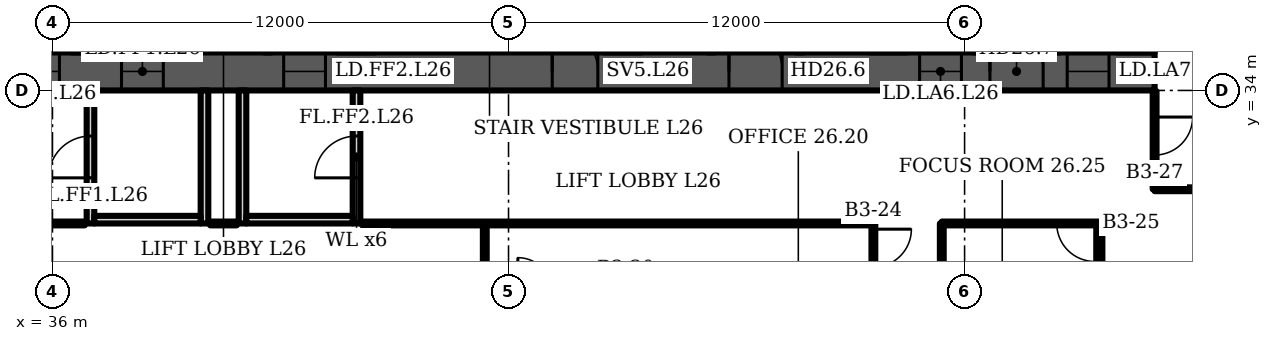
"""IFC4 building model, lengths in metres.
Left out: names, types, materials, properties, quantities, classifications, styles, units other than length and angle.
Written with IfcOpenShell. Run it as: python <this file> out.ifc"""

import sys

from ifc_helpers import new_model, si_unit, direction, frame, frame_2d, origin, place, context, subcontext, project, spatial, rectangle, extrude, element, fill, save


model = new_model("IFC4")
c1 = context("Model", 3, precision=1e-05, world=origin(), true_north=direction((0.0, 1.0)))
c2 = subcontext(c1, "Body", "Model", "MODEL_VIEW")
j1 = project(units=[si_unit("LENGTHUNIT", "METRE"), si_unit("PLANEANGLEUNIT", "RADIAN")], contexts=[c1])
p1 = place(None, origin())
s1 = spatial("IfcSite", under=j1, at=p1, CompositionType="ELEMENT")
p2 = place(p1, origin())
s2 = spatial("IfcBuilding", under=s1, at=p2, CompositionType="ELEMENT")
p3 = place(p2, frame((0.0, 0.0, 114.7)))
s3 = spatial("IfcBuildingStorey", under=s2, at=p3, CompositionType="ELEMENT", Elevation=114.7)
p4 = place(p3, frame((16.0, 34.5, 0.0), z_axis=(0.0, 0.0, 1.0), x_axis=(1.0, 0.0, 0.0)))
e1 = element("IfcWall", 1, at=p4, inside=s3, PredefinedType="SHEAR", context=c2, shape_type="SweptSolid", body=[
    extrude(rectangle(XDim=49.0, YDim=1.0, at=frame_2d((24.5, 0.0))), origin(), (0.0, 0.0, 1.0), 3.6),
])
p5 = place(p4, frame((1.2, 0.0, 0.0)))
e2 = element("IfcOpeningElement", 2, at=p5, cuts=e1, PredefinedType="OPENING", context=c2, shape_type="SweptSolid", body=[
    extrude(rectangle(XDim=1.1, YDim=2.1, at=frame_2d((0.55, 1.05))), frame((0.0, 0.51, 0.0), z_axis=(0.0, -1.0, 0.0), x_axis=(1.0, 0.0, 0.0)), (0.0, 0.0, 1.0), 1.02),
])
p6 = place(p4, frame((5.083, 0.0, 0.0)))
e3 = element("IfcOpeningElement", 3, at=p6, cuts=e1, PredefinedType="OPENING", context=c2, shape_type="SweptSolid", body=[
    extrude(rectangle(XDim=1.1, YDim=2.1, at=frame_2d((0.55, 1.05))), frame((0.0, 0.51, 0.0), z_axis=(0.0, -1.0, 0.0), x_axis=(1.0, 0.0, 0.0)), (0.0, 0.0, 1.0), 1.02),
])
p7 = place(p4, frame((2.933, 0.0, 0.0)))
e4 = element("IfcOpeningElement", 4, at=p7, cuts=e1, PredefinedType="OPENING", context=c2, shape_type="SweptSolid", body=[
    extrude(rectangle(XDim=1.4, YDim=2.1, at=frame_2d((0.7, 1.05))), frame((0.0, 0.51, 0.0), z_axis=(0.0, -1.0, 0.0), x_axis=(1.0, 0.0, 0.0)), (0.0, 0.0, 1.0), 1.02),
])
p8 = place(p4, frame((7.65, 0.0, 0.0)))
e5 = element("IfcOpeningElement", 5, at=p8, cuts=e1, PredefinedType="OPENING", context=c2, shape_type="SweptSolid", body=[
    extrude(rectangle(XDim=1.2, YDim=2.1, at=frame_2d((0.6, 1.05))), frame((0.0, 0.51, 0.0), z_axis=(0.0, -1.0, 0.0), x_axis=(1.0, 0.0, 0.0)), (0.0, 0.0, 1.0), 1.02),
])
p9 = place(p4, frame((14.817, 0.0, 0.0)))
e6 = element("IfcOpeningElement", 6, at=p9, cuts=e1, PredefinedType="OPENING", context=c2, shape_type="SweptSolid", body=[
    extrude(rectangle(XDim=1.1, YDim=2.1, at=frame_2d((0.55, 1.05))), frame((0.0, 0.51, 0.0), z_axis=(0.0, -1.0, 0.0), x_axis=(1.0, 0.0, 0.0)), (0.0, 0.0, 1.0), 1.02),
])
p10 = place(p4, frame((19.083, 0.0, 0.0)))
e7 = element("IfcOpeningElement", 7, at=p10, cuts=e1, PredefinedType="OPENING", context=c2, shape_type="SweptSolid", body=[
    extrude(rectangle(XDim=1.1, YDim=2.1, at=frame_2d((0.55, 1.05))), frame((0.0, 0.51, 0.0), z_axis=(0.0, -1.0, 0.0), x_axis=(1.0, 0.0, 0.0)), (0.0, 0.0, 1.0), 1.02),
])
p11 = place(p4, frame((16.8, 0.0, 0.0)))
e8 = element("IfcOpeningElement", 8, at=p11, cuts=e1, PredefinedType="OPENING", context=c2, shape_type="SweptSolid", body=[
    extrude(rectangle(XDim=1.4, YDim=2.1, at=frame_2d((0.7, 1.05))), frame((0.0, 0.51, 0.0), z_axis=(0.0, -1.0, 0.0), x_axis=(1.0, 0.0, 0.0)), (0.0, 0.0, 1.0), 1.02),
])
p12 = place(p4, frame((21.817, 0.0, 0.0)))
e9 = element("IfcOpeningElement", 9, at=p12, cuts=e1, PredefinedType="OPENING", context=c2, shape_type="SweptSolid", body=[
    extrude(rectangle(XDim=1.1, YDim=2.1, at=frame_2d((0.55, 1.05))), frame((0.0, 0.51, 0.0), z_axis=(0.0, -1.0, 0.0), x_axis=(1.0, 0.0, 0.0)), (0.0, 0.0, 1.0), 1.02),
])
p13 = place(p4, frame((26.083, 0.0, 0.0)))
e10 = element("IfcOpeningElement", 10, at=p13, cuts=e1, PredefinedType="OPENING", context=c2, shape_type="SweptSolid", body=[
    extrude(rectangle(XDim=1.1, YDim=2.1, at=frame_2d((0.55, 1.05))), frame((0.0, 0.51, 0.0), z_axis=(0.0, -1.0, 0.0), x_axis=(1.0, 0.0, 0.0)), (0.0, 0.0, 1.0), 1.02),
])
p14 = place(p4, frame((33.15, 0.0, 0.0)))
e11 = element("IfcOpeningElement", 11, at=p14, cuts=e1, PredefinedType="OPENING", context=c2, shape_type="SweptSolid", body=[
    extrude(rectangle(XDim=1.2, YDim=2.1, at=frame_2d((0.6, 1.05))), frame((0.0, 0.51, 0.0), z_axis=(0.0, -1.0, 0.0), x_axis=(1.0, 0.0, 0.0)), (0.0, 0.0, 1.0), 1.02),
])
p15 = place(p4, frame((37.8, 0.0, 0.0)))
e12 = element("IfcOpeningElement", 12, at=p15, cuts=e1, PredefinedType="OPENING", context=c2, shape_type="SweptSolid", body=[
    extrude(rectangle(XDim=1.4, YDim=2.1, at=frame_2d((0.7, 1.05))), frame((0.0, 0.51, 0.0), z_axis=(0.0, -1.0, 0.0), x_axis=(1.0, 0.0, 0.0)), (0.0, 0.0, 1.0), 1.02),
])
p16 = place(p4, frame((42.817, 0.0, 0.0)))
e13 = element("IfcOpeningElement", 13, at=p16, cuts=e1, PredefinedType="OPENING", context=c2, shape_type="SweptSolid", body=[
    extrude(rectangle(XDim=1.1, YDim=2.1, at=frame_2d((0.55, 1.05))), frame((0.0, 0.51, 0.0), z_axis=(0.0, -1.0, 0.0), x_axis=(1.0, 0.0, 0.0)), (0.0, 0.0, 1.0), 1.02),
])
p17 = place(p4, frame((46.7, 0.0, 0.0)))
e14 = element("IfcOpeningElement", 14, at=p17, cuts=e1, PredefinedType="OPENING", context=c2, shape_type="SweptSolid", body=[
    extrude(rectangle(XDim=1.1, YDim=2.1, at=frame_2d((0.55, 1.05))), frame((0.0, 0.51, 0.0), z_axis=(0.0, -1.0, 0.0), x_axis=(1.0, 0.0, 0.0)), (0.0, 0.0, 1.0), 1.02),
])
p18 = place(p4, frame((44.667, 0.0, 0.0)))
e15 = element("IfcOpeningElement", 15, at=p18, cuts=e1, PredefinedType="OPENING", context=c2, shape_type="SweptSolid", body=[
    extrude(rectangle(XDim=1.4, YDim=2.1, at=frame_2d((0.7, 1.05))), frame((0.0, 0.51, 0.0), z_axis=(0.0, -1.0, 0.0), x_axis=(1.0, 0.0, 0.0)), (0.0, 0.0, 1.0), 1.02),
])
p19 = place(p3, frame((37.0, 30.5, 0.0), z_axis=(0.0, 0.0, 1.0), x_axis=(0.0, 1.0, 0.0)))
e16 = element("IfcWall", 16, at=p19, inside=s3, PredefinedType="PARTITIONING", context=c2, shape_type="SweptSolid", body=[
    extrude(rectangle(XDim=3.5, YDim=0.2, at=frame_2d((1.75, 0.0))), origin(), (0.0, 0.0, 1.0), 3.2),
])
p20 = place(p19, frame((1.2, 0.0, 0.0)))
e17 = element("IfcOpeningElement", 17, at=p20, cuts=e16, PredefinedType="OPENING", context=c2, shape_type="SweptSolid", body=[
    extrude(rectangle(XDim=1.1, YDim=2.1, at=frame_2d((0.55, 1.05))), frame((0.0, 0.11, 0.0), z_axis=(0.0, -1.0, 0.0), x_axis=(1.0, 0.0, 0.0)), (0.0, 0.0, 1.0), 0.22),
])
p21 = place(p3, frame((40.0, 30.5, 0.0), z_axis=(0.0, 0.0, 1.0), x_axis=(0.0, 1.0, 0.0)))
e18 = element("IfcWall", 18, at=p21, inside=s3, PredefinedType="PARTITIONING", context=c2, shape_type="SweptSolid", body=[
    extrude(rectangle(XDim=3.5, YDim=0.2, at=frame_2d((1.75, 0.0))), origin(), (0.0, 0.0, 1.0), 3.2),
])
p22 = place(p3, frame((37.1, 30.6, 0.0), z_axis=(0.0, 0.0, 1.0), x_axis=(1.0, 0.0, 0.0)))
e19 = element("IfcWall", 19, at=p22, inside=s3, PredefinedType="PARTITIONING", context=c2, shape_type="SweptSolid", body=[
    extrude(rectangle(XDim=2.8, YDim=0.2, at=frame_2d((1.4, 0.0))), origin(), (0.0, 0.0, 1.0), 3.2),
])
p23 = place(p3, frame((41.0, 30.5, 0.0), z_axis=(0.0, 0.0, 1.0), x_axis=(0.0, 1.0, 0.0)))
e20 = element("IfcWall", 20, at=p23, inside=s3, PredefinedType="PARTITIONING", context=c2, shape_type="SweptSolid", body=[
    extrude(rectangle(XDim=3.5, YDim=0.2, at=frame_2d((1.75, 0.0))), origin(), (0.0, 0.0, 1.0), 3.2),
])
p24 = place(p3, frame((44.0, 30.5, 0.0), z_axis=(0.0, 0.0, 1.0), x_axis=(0.0, 1.0, 0.0)))
e21 = element("IfcWall", 21, at=p24, inside=s3, PredefinedType="PARTITIONING", context=c2, shape_type="SweptSolid", body=[
    extrude(rectangle(XDim=3.5, YDim=0.2, at=frame_2d((1.75, 0.0))), origin(), (0.0, 0.0, 1.0), 3.2),
])
p25 = place(p24, frame((1.2, 0.0, 0.0)))
e22 = element("IfcOpeningElement", 22, at=p25, cuts=e21, PredefinedType="OPENING", context=c2, shape_type="SweptSolid", body=[
    extrude(rectangle(XDim=1.1, YDim=2.1, at=frame_2d((0.55, 1.05))), frame((0.0, 0.11, 0.0), z_axis=(0.0, -1.0, 0.0), x_axis=(1.0, 0.0, 0.0)), (0.0, 0.0, 1.0), 0.22),
])
p26 = place(p3, frame((41.1, 30.6, 0.0), z_axis=(0.0, 0.0, 1.0), x_axis=(1.0, 0.0, 0.0)))
e23 = element("IfcWall", 23, at=p26, inside=s3, PredefinedType="PARTITIONING", context=c2, shape_type="SweptSolid", body=[
    extrude(rectangle(XDim=2.8, YDim=0.2, at=frame_2d((1.4, 0.0))), origin(), (0.0, 0.0, 1.0), 3.2),
])
p27 = place(p3, frame((33.4, 30.5, 0.0), z_axis=(0.0, 0.0, 1.0), x_axis=(1.0, 0.0, 0.0)))
e24 = element("IfcWall", 24, at=p27, inside=s3, PredefinedType="PARTITIONING", context=c2, shape_type="SweptSolid", body=[
    extrude(rectangle(XDim=3.45, YDim=0.1, at=frame_2d((1.725, 0.0))), origin(), (0.0, 0.0, 1.0), 3.2),
])
p28 = place(p3, frame((47.375, 15.13, 0.0), z_axis=(0.0, 0.0, 1.0), x_axis=(0.0, 1.0, 0.0)))
e25 = element("IfcWall", 25, at=p28, inside=s3, PredefinedType="PARTITIONING", context=c2, shape_type="SweptSolid", body=[
    extrude(rectangle(XDim=15.36, YDim=0.1, at=frame_2d((7.68, 0.0))), origin(), (0.0, 0.0, 1.0), 3.2),
])
p29 = place(p3, frame((57.6, -0.79, 0.0), z_axis=(0.0, 0.0, 1.0), x_axis=(0.0, 1.0, 0.0)))
e26 = element("IfcWall", 26, at=p29, inside=s3, PredefinedType="PARTITIONING", context=c2, shape_type="SweptSolid", body=[
    extrude(rectangle(XDim=31.29, YDim=0.1, at=frame_2d((15.645, 0.0))), origin(), (0.0, 0.0, 1.0), 2.58),
])
p30 = place(p29, frame((7.5, 0.0, 0.0)))
e27 = element("IfcOpeningElement", 27, at=p30, cuts=e26, PredefinedType="OPENING", context=c2, shape_type="SweptSolid", body=[
    extrude(rectangle(XDim=1.0, YDim=2.1, at=frame_2d((0.5, 1.05))), frame((0.0, 0.06, 0.0), z_axis=(0.0, -1.0, 0.0), x_axis=(1.0, 0.0, 0.0)), (0.0, 0.0, 1.0), 0.12),
])
p31 = place(p29, frame((17.344, 0.0, 0.0)))
e28 = element("IfcOpeningElement", 28, at=p31, cuts=e26, PredefinedType="OPENING", context=c2, shape_type="SweptSolid", body=[
    extrude(rectangle(XDim=1.0, YDim=2.1, at=frame_2d((0.5, 1.05))), frame((0.0, 0.06, 0.0), z_axis=(0.0, -1.0, 0.0), x_axis=(1.0, 0.0, 0.0)), (0.0, 0.0, 1.0), 0.12),
])
p32 = place(p29, frame((21.185, 0.0, 0.0)))
e29 = element("IfcOpeningElement", 29, at=p32, cuts=e26, PredefinedType="OPENING", context=c2, shape_type="SweptSolid", body=[
    extrude(rectangle(XDim=1.0, YDim=2.1, at=frame_2d((0.5, 1.05))), frame((0.0, 0.06, 0.0), z_axis=(0.0, -1.0, 0.0), x_axis=(1.0, 0.0, 0.0)), (0.0, 0.0, 1.0), 0.12),
])
p33 = place(p29, frame((25.03, 0.0, 0.0)))
e30 = element("IfcOpeningElement", 30, at=p33, cuts=e26, PredefinedType="OPENING", context=c2, shape_type="SweptSolid", body=[
    extrude(rectangle(XDim=1.0, YDim=2.1, at=frame_2d((0.5, 1.05))), frame((0.0, 0.06, 0.0), z_axis=(0.0, -1.0, 0.0), x_axis=(1.0, 0.0, 0.0)), (0.0, 0.0, 1.0), 0.12),
])
p34 = place(p29, frame((30.139, 0.0, 0.0)))
e31 = element("IfcOpeningElement", 31, at=p34, cuts=e26, PredefinedType="OPENING", context=c2, shape_type="SweptSolid", body=[
    extrude(rectangle(XDim=1.0, YDim=2.1, at=frame_2d((0.5, 1.05))), frame((0.0, 0.06, 0.0), z_axis=(0.0, -1.0, 0.0), x_axis=(1.0, 0.0, 0.0)), (0.0, 0.0, 1.0), 0.12),
])
p35 = place(p3, frame((59.4, 13.7, 0.0), z_axis=(0.0, 0.0, 1.0), x_axis=(0.0, 1.0, 0.0)))
e32 = element("IfcWall", 32, at=p35, inside=s3, PredefinedType="PARTITIONING", context=c2, shape_type="SweptSolid", body=[
    extrude(rectangle(XDim=16.8, YDim=0.1, at=frame_2d((8.4, 0.0))), origin(), (0.0, 0.0, 1.0), 3.2),
])
p36 = place(p35, frame((2.45, 0.0, 0.0)))
e33 = element("IfcOpeningElement", 33, at=p36, cuts=e32, PredefinedType="OPENING", context=c2, shape_type="SweptSolid", body=[
    extrude(rectangle(XDim=1.0, YDim=2.1, at=frame_2d((0.5, 1.05))), frame((0.0, 0.06, 0.0), z_axis=(0.0, -1.0, 0.0), x_axis=(1.0, 0.0, 0.0)), (0.0, 0.0, 1.0), 0.12),
])
p37 = place(p35, frame((7.125, 0.0, 0.0)))
e34 = element("IfcOpeningElement", 34, at=p37, cuts=e32, PredefinedType="OPENING", context=c2, shape_type="SweptSolid", body=[
    extrude(rectangle(XDim=1.0, YDim=2.1, at=frame_2d((0.5, 1.05))), frame((0.0, 0.06, 0.0), z_axis=(0.0, -1.0, 0.0), x_axis=(1.0, 0.0, 0.0)), (0.0, 0.0, 1.0), 0.12),
])
p38 = place(p35, frame((11.675, 0.0, 0.0)))
e35 = element("IfcOpeningElement", 35, at=p38, cuts=e32, PredefinedType="OPENING", context=c2, shape_type="SweptSolid", body=[
    extrude(rectangle(XDim=1.0, YDim=2.1, at=frame_2d((0.5, 1.05))), frame((0.0, 0.06, 0.0), z_axis=(0.0, -1.0, 0.0), x_axis=(1.0, 0.0, 0.0)), (0.0, 0.0, 1.0), 0.12),
])
p39 = place(p3, frame((59.4, 30.5, 0.0), z_axis=(0.0, 0.0, 1.0), x_axis=(1.0, 0.0, 0.0)))
e36 = element("IfcWall", 36, at=p39, inside=s3, PredefinedType="PARTITIONING", context=c2, shape_type="SweptSolid", body=[
    extrude(rectangle(XDim=4.175, YDim=0.1, at=frame_2d((2.087, 0.0))), origin(), (0.0, 0.0, 1.0), 3.2),
])
p40 = place(p39, frame((3.025, 0.0, 0.0)))
e37 = element("IfcOpeningElement", 37, at=p40, cuts=e36, PredefinedType="OPENING", context=c2, shape_type="SweptSolid", body=[
    extrude(rectangle(XDim=1.0, YDim=2.1, at=frame_2d((0.5, 1.05))), frame((0.0, 0.06, 0.0), z_axis=(0.0, -1.0, 0.0), x_axis=(1.0, 0.0, 0.0)), (0.0, 0.0, 1.0), 0.12),
])
p41 = place(p3, frame((63.575, 29.075, 0.0), z_axis=(0.0, 0.0, 1.0), x_axis=(0.0, 1.0, 0.0)))
e38 = element("IfcWall", 38, at=p41, inside=s3, PredefinedType="PARTITIONING", context=c2, shape_type="SweptSolid", body=[
    extrude(rectangle(XDim=1.425, YDim=0.1, at=frame_2d((0.712, 0.0))), origin(), (0.0, 0.0, 1.0), 3.2),
])
p42 = place(p3, frame((65.0, 31.4, 0.0), z_axis=(0.0, 0.0, 1.0), x_axis=(0.0, 1.0, 0.0)))
e39 = element("IfcWall", 39, at=p42, inside=s3, PredefinedType="PARTITIONING", context=c2, shape_type="SweptSolid", body=[
    extrude(rectangle(XDim=2.58, YDim=0.1, at=frame_2d((1.29, 0.0))), origin(), (0.0, 0.0, 1.0), 3.2),
])
p43 = place(p42, frame((0.9, 0.0, 0.0)))
e40 = element("IfcOpeningElement", 40, at=p43, cuts=e39, PredefinedType="OPENING", context=c2, shape_type="SweptSolid", body=[
    extrude(rectangle(XDim=1.0, YDim=2.1, at=frame_2d((0.5, 1.05))), frame((0.0, 0.06, 0.0), z_axis=(0.0, -1.0, 0.0), x_axis=(1.0, 0.0, 0.0)), (0.0, 0.0, 1.0), 0.12),
])
p44 = place(p3, frame((65.0, 31.4, 0.0), z_axis=(0.0, 0.0, 1.0), x_axis=(1.0, 0.0, 0.0)))
e41 = element("IfcWall", 41, at=p44, inside=s3, PredefinedType="PARTITIONING", context=c2, shape_type="SweptSolid", body=[
    extrude(rectangle(XDim=4.69, YDim=0.1, at=frame_2d((2.345, 0.0))), origin(), (0.0, 0.0, 1.0), 3.2),
])
p45 = place(p3, frame((40.15, 30.5, 0.0), z_axis=(0.0, 0.0, 1.0), x_axis=(1.0, 0.0, 0.0)))
e42 = element("IfcWall", 42, at=p45, inside=s3, PredefinedType="PARTITIONING", context=c2, shape_type="SweptSolid", body=[
    extrude(rectangle(XDim=0.7, YDim=0.1, at=frame_2d((0.35, 0.0))), origin(), (0.0, 0.0, 1.0), 3.2),
])
p46 = place(p3, frame((44.15, 30.5, 0.0), z_axis=(0.0, 0.0, 1.0), x_axis=(1.0, 0.0, 0.0)))
e43 = element("IfcWall", 43, at=p46, inside=s3, PredefinedType="PARTITIONING", context=c2, shape_type="SweptSolid", body=[
    extrude(rectangle(XDim=13.45, YDim=0.1, at=frame_2d((6.725, 0.0))), origin(), (0.0, 0.0, 1.0), 3.2),
])
p47 = place(p10, origin())
e44 = element("IfcDoor", 44, at=p47, inside=s3, OperationType="DOUBLE_DOOR_SLIDING", PredefinedType="DOOR", context=c2, shape_type="SweptSolid", body=[
    extrude(rectangle(XDim=1.1, YDim=2.1, at=frame_2d((0.55, 1.05))), frame((0.0, 0.025, 0.0), z_axis=(0.0, -1.0, 0.0), x_axis=(1.0, 0.0, 0.0)), (0.0, 0.0, 1.0), 0.05),
])
fill(e7, e44)
p48 = place(p12, origin())
e45 = element("IfcDoor", 45, at=p48, inside=s3, OperationType="DOUBLE_DOOR_SLIDING", PredefinedType="DOOR", context=c2, shape_type="SweptSolid", body=[
    extrude(rectangle(XDim=1.1, YDim=2.1, at=frame_2d((0.55, 1.05))), frame((0.0, 0.025, 0.0), z_axis=(0.0, -1.0, 0.0), x_axis=(1.0, 0.0, 0.0)), (0.0, 0.0, 1.0), 0.05),
])
fill(e9, e45)
p49 = place(p13, origin())
e46 = element("IfcDoor", 46, at=p49, inside=s3, OperationType="DOUBLE_DOOR_SLIDING", PredefinedType="DOOR", context=c2, shape_type="SweptSolid", body=[
    extrude(rectangle(XDim=1.1, YDim=2.1, at=frame_2d((0.55, 1.05))), frame((0.0, 0.025, 0.0), z_axis=(0.0, -1.0, 0.0), x_axis=(1.0, 0.0, 0.0)), (0.0, 0.0, 1.0), 0.05),
])
fill(e10, e46)
p50 = place(p14, origin())
e47 = element("IfcDoor", 47, at=p50, inside=s3, OperationType="SINGLE_SWING_LEFT", PredefinedType="DOOR", context=c2, shape_type="SweptSolid", body=[
    extrude(rectangle(XDim=1.2, YDim=2.1, at=frame_2d((0.6, 1.05))), frame((0.0, 0.025, 0.0), z_axis=(0.0, -1.0, 0.0), x_axis=(1.0, 0.0, 0.0)), (0.0, 0.0, 1.0), 0.05),
])
fill(e11, e47)
p51 = place(p15, origin())
e48 = element("IfcDoor", 48, at=p51, inside=s3, OperationType="DOUBLE_DOOR_SINGLE_SWING", PredefinedType="DOOR", context=c2, shape_type="SweptSolid", body=[
    extrude(rectangle(XDim=1.4, YDim=2.1, at=frame_2d((0.7, 1.05))), frame((0.0, 0.025, 0.0), z_axis=(0.0, -1.0, 0.0), x_axis=(1.0, 0.0, 0.0)), (0.0, 0.0, 1.0), 0.05),
])
fill(e12, e48)
p52 = place(p16, origin())
e49 = element("IfcDoor", 49, at=p52, inside=s3, OperationType="DOUBLE_DOOR_SLIDING", PredefinedType="DOOR", context=c2, shape_type="SweptSolid", body=[
    extrude(rectangle(XDim=1.1, YDim=2.1, at=frame_2d((0.55, 1.05))), frame((0.0, 0.025, 0.0), z_axis=(0.0, -1.0, 0.0), x_axis=(1.0, 0.0, 0.0)), (0.0, 0.0, 1.0), 0.05),
])
fill(e13, e49)
p53 = place(p17, origin())
e50 = element("IfcDoor", 50, at=p53, inside=s3, OperationType="DOUBLE_DOOR_SLIDING", PredefinedType="DOOR", context=c2, shape_type="SweptSolid", body=[
    extrude(rectangle(XDim=1.1, YDim=2.1, at=frame_2d((0.55, 1.05))), frame((0.0, 0.025, 0.0), z_axis=(0.0, -1.0, 0.0), x_axis=(1.0, 0.0, 0.0)), (0.0, 0.0, 1.0), 0.05),
])
fill(e14, e50)
p54 = place(p18, origin())
e51 = element("IfcDoor", 51, at=p54, inside=s3, OperationType="DOUBLE_DOOR_SINGLE_SWING", PredefinedType="DOOR", context=c2, shape_type="SweptSolid", body=[
    extrude(rectangle(XDim=1.4, YDim=2.1, at=frame_2d((0.7, 1.05))), frame((0.0, 0.025, 0.0), z_axis=(0.0, -1.0, 0.0), x_axis=(1.0, 0.0, 0.0)), (0.0, 0.0, 1.0), 0.05),
])
fill(e15, e51)
p55 = place(p20, origin())
e52 = element("IfcDoor", 52, at=p55, inside=s3, OperationType="SINGLE_SWING_LEFT", PredefinedType="DOOR", context=c2, shape_type="SweptSolid", body=[
    extrude(rectangle(XDim=1.1, YDim=2.1, at=frame_2d((0.55, 1.05))), frame((0.0, 0.025, 0.0), z_axis=(0.0, -1.0, 0.0), x_axis=(1.0, 0.0, 0.0)), (0.0, 0.0, 1.0), 0.05),
])
fill(e17, e52)
p56 = place(p25, origin())
e53 = element("IfcDoor", 53, at=p56, inside=s3, OperationType="SINGLE_SWING_LEFT", PredefinedType="DOOR", context=c2, shape_type="SweptSolid", body=[
    extrude(rectangle(XDim=1.1, YDim=2.1, at=frame_2d((0.55, 1.05))), frame((0.0, 0.025, 0.0), z_axis=(0.0, -1.0, 0.0), x_axis=(1.0, 0.0, 0.0)), (0.0, 0.0, 1.0), 0.05),
])
fill(e22, e53)
p57 = place(p34, origin())
e54 = element("IfcDoor", 54, at=p57, inside=s3, OperationType="SINGLE_SWING_RIGHT", PredefinedType="DOOR", context=c2, shape_type="SweptSolid", body=[
    extrude(rectangle(XDim=1.0, YDim=2.1, at=frame_2d((0.5, 1.05))), frame((0.0, 0.025, 0.0), z_axis=(0.0, -1.0, 0.0), x_axis=(1.0, 0.0, 0.0)), (0.0, 0.0, 1.0), 0.05),
])
fill(e31, e54)
p58 = place(p40, origin())
e55 = element("IfcDoor", 55, at=p58, inside=s3, OperationType="SINGLE_SWING_RIGHT", PredefinedType="DOOR", context=c2, shape_type="SweptSolid", body=[
    extrude(rectangle(XDim=1.0, YDim=2.1, at=frame_2d((0.5, 1.05))), frame((0.0, 0.025, 0.0), z_axis=(0.0, -1.0, 0.0), x_axis=(1.0, 0.0, 0.0)), (0.0, 0.0, 1.0), 0.05),
])
fill(e37, e55)
p59 = place(p43, origin())
e56 = element("IfcDoor", 56, at=p59, inside=s3, OperationType="SINGLE_SWING_RIGHT", PredefinedType="DOOR", context=c2, shape_type="SweptSolid", body=[
    extrude(rectangle(XDim=1.0, YDim=2.1, at=frame_2d((0.5, 1.05))), frame((0.0, 0.025, 0.0), z_axis=(0.0, -1.0, 0.0), x_axis=(1.0, 0.0, 0.0)), (0.0, 0.0, 1.0), 0.05),
])
fill(e40, e56)
save(model, sys.argv[1])
